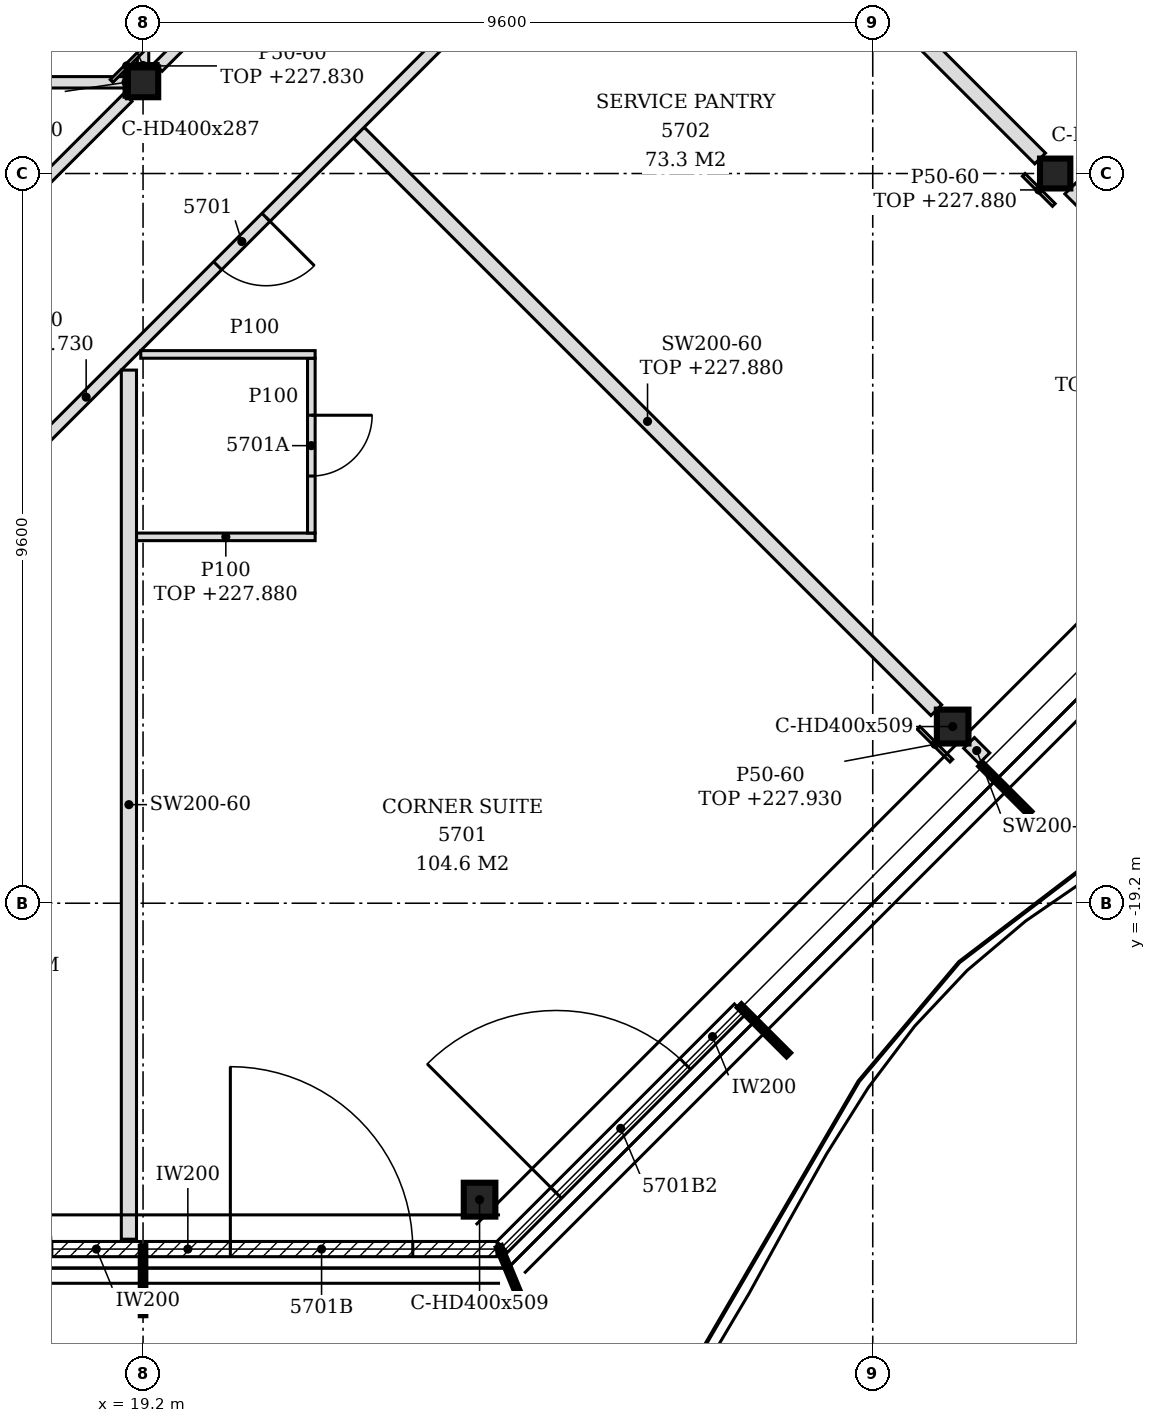
"""IFC4 building model, lengths in metres.
Left out: names, types, materials, properties, quantities, classifications, styles, units other than length and angle.
Written with IfcOpenShell. Run it as: python <this file> out.ifc"""

import sys

from ifc_helpers import new_model, si_unit, direction, frame, frame_2d, origin, origin_2d, place, context, subcontext, project, spatial, polyline, rectangle, i_section, outline, extrude, element, fill, save


model = new_model("IFC4")
c1 = context("Model", 3, precision=1e-05, world=origin(), true_north=direction((0.0, 1.0)))
c2 = subcontext(c1, "Body", "Model", "MODEL_VIEW")
j1 = project(units=[si_unit("LENGTHUNIT", "METRE"), si_unit("PLANEANGLEUNIT", "RADIAN")], contexts=[c1])
p1 = place(None, origin())
s1 = spatial("IfcSite", under=j1, at=p1, CompositionType="ELEMENT")
p2 = place(p1, origin())
s2 = spatial("IfcBuilding", under=s1, at=p2, CompositionType="ELEMENT")
p3 = place(p2, frame((0.0, 0.0, 225.0)))
s3 = spatial("IfcBuildingStorey", under=s2, at=p3, CompositionType="ELEMENT", Elevation=225.0)
for number, where, z_axis, x_axis in (
    (1, (23.627, -23.1, -0.15), (0.0, 0.0, 1.0), (1.0, 0.0, 0.0)),
    (2, (29.852, -16.876, -0.15), (0.0, 0.0, 1.0), (1.0, 0.0, 0.0)),
):
    element("IfcColumn", number, at=place(p3, frame(where, z_axis=z_axis, x_axis=x_axis)), inside=s3, PredefinedType="COLUMN", context=c2, shape_type="SweptSolid", body=[
        extrude(i_section(OverallWidth=0.416, OverallDepth=0.446, WebThickness=0.039, FlangeThickness=0.063, FilletRadius=0.015, at=origin_2d()), origin(), (0.0, 0.0, 1.0), 3.6),
    ])
for number, where, z_axis, x_axis in (
    (3, (19.2, -8.4, -0.15), (0.0, 0.0, 1.0), (1.0, 0.0, 0.0)),
    (4, (31.2, -9.6, -0.15), (0.0, 0.0, 1.0), (1.0, 0.0, 0.0)),
):
    element("IfcColumn", number, at=place(p3, frame(where, z_axis=z_axis, x_axis=x_axis)), inside=s3, PredefinedType="COLUMN", context=c2, shape_type="SweptSolid", body=[
        extrude(i_section(OverallWidth=0.399, OverallDepth=0.393, WebThickness=0.023, FlangeThickness=0.037, FilletRadius=0.015, at=origin_2d()), origin(), (0.0, 0.0, 1.0), 3.6),
    ])
p4 = place(p3, frame((14.43, -23.75, 0.0), z_axis=(0.0, 0.0, 1.0), x_axis=(1.0, 0.0, 0.0)))
e5 = element("IfcWall", 5, at=p4, inside=s3, PredefinedType="NOTDEFINED", context=c2, shape_type="SweptSolid", body=[
    extrude(rectangle(XDim=4.74, YDim=0.2, at=frame_2d((2.37, 0.0))), origin(), (0.0, 0.0, 1.0), 3.45),
])
p5 = place(p4, frame((1.17, 0.0, 0.0)))
e6 = element("IfcOpeningElement", 6, at=p5, cuts=e5, PredefinedType="OPENING", context=c2, shape_type="SweptSolid", body=[
    extrude(rectangle(XDim=2.4, YDim=2.4, at=frame_2d((1.2, 1.2))), frame((0.0, 0.11, 0.0), z_axis=(0.0, -1.0, 0.0), x_axis=(1.0, 0.0, 0.0)), (0.0, 0.0, 1.0), 0.22),
])
p6 = place(p3, frame((19.23, -23.75, 0.0), z_axis=(0.0, 0.0, 1.0), x_axis=(1.0, 0.0, 0.0)))
e7 = element("IfcWall", 7, at=p6, inside=s3, PredefinedType="NOTDEFINED", context=c2, shape_type="SweptSolid", body=[
    extrude(rectangle(XDim=4.626, YDim=0.2, at=frame_2d((2.313, 0.0))), origin(), (0.0, 0.0, 1.0), 3.45),
])
p7 = place(p6, frame((1.119, 0.0, 0.0)))
e8 = element("IfcOpeningElement", 8, at=p7, cuts=e7, PredefinedType="OPENING", context=c2, shape_type="SweptSolid", body=[
    extrude(rectangle(XDim=2.4, YDim=2.4, at=frame_2d((1.2, 1.2))), frame((0.0, 0.11, 0.0), z_axis=(0.0, -1.0, 0.0), x_axis=(1.0, 0.0, 0.0)), (0.0, 0.0, 1.0), 0.22),
])
p8 = place(p3, frame((23.925, -23.722, 0.0), z_axis=(0.0, 0.0, 1.0), x_axis=(0.707106781187, 0.707106781187, 0.0)))
e9 = element("IfcWall", 9, at=p8, inside=s3, PredefinedType="NOTDEFINED", context=c2, shape_type="SweptSolid", body=[
    extrude(rectangle(XDim=4.421, YDim=0.2, at=frame_2d((2.21, 0.0))), origin(), (0.0, 0.0, 1.0), 3.45),
])
p9 = place(p8, frame((1.005, 0.0, 0.0)))
e10 = element("IfcOpeningElement", 10, at=p9, cuts=e9, PredefinedType="OPENING", context=c2, shape_type="SweptSolid", body=[
    extrude(rectangle(XDim=2.4, YDim=2.4, at=frame_2d((1.2, 1.2))), frame((0.0, 0.11, 0.0), z_axis=(0.0, -1.0, 0.0), x_axis=(1.0, 0.0, 0.0)), (0.0, 0.0, 1.0), 0.22),
])
p10 = place(p3, frame((19.014, -23.62, 0.0), z_axis=(0.0, 0.0, 1.0), x_axis=(0.0, 1.0, 0.0)))
e11 = element("IfcWall", 11, at=p10, inside=s3, PredefinedType="PARTITIONING", context=c2, shape_type="SweptSolid", body=[
    extrude(outline(polyline([(0.0, 0.0), (11.434, 0.0), (11.434, 2.73), (0.64, 2.73), (0.638, 2.93), (0.37, 2.93), (0.368, 3.45), (0.0, 3.45), (0.0, 0.0)])), frame((0.0, 0.1, 0.0), z_axis=(0.0, -1.0, 0.0), x_axis=(1.0, 0.0, 0.0)), (0.0, 0.0, 1.0), 0.2),
])
p11 = place(p3, frame((30.269, -17.293, 0.0), z_axis=(0.0, 0.0, 1.0), x_axis=(-0.707106781187, 0.707106781187, 0.0)))
e12 = element("IfcWall", 12, at=p11, inside=s3, PredefinedType="PARTITIONING", context=c2, shape_type="SweptSolid", body=[
    extrude(rectangle(XDim=0.285, YDim=0.2, at=frame_2d((0.143, 0.0))), origin(), (0.0, 0.0, 1.0), 3.45),
])
p12 = place(p3, frame((29.636, -16.66, 0.0), z_axis=(0.0, 0.0, 1.0), x_axis=(-0.707095420673, 0.707118141518, 0.0)))
e13 = element("IfcWall", 13, at=p12, inside=s3, PredefinedType="PARTITIONING", context=c2, shape_type="SweptSolid", body=[
    extrude(rectangle(XDim=10.745, YDim=0.2, at=frame_2d((5.373, 0.0))), origin(), (0.0, 0.0, 1.0), 2.88),
])
p13 = place(p3, frame((19.114, -14.38, 0.0), z_axis=(0.0, 0.0, 1.0), x_axis=(1.0, 0.0, 0.0)))
e14 = element("IfcWall", 14, at=p13, inside=s3, PredefinedType="PARTITIONING", context=c2, shape_type="SweptSolid", body=[
    extrude(outline(polyline([(0.0, 0.0), (2.35, 0.0), (2.35, 2.88), (0.236, 2.88), (0.234, 2.73), (0.0, 2.73), (0.0, 0.0)])), frame((0.0, 0.05, 0.0), z_axis=(0.0, -1.0, 0.0), x_axis=(1.0, 0.0, 0.0)), (0.0, 0.0, 1.0), 0.1),
])
p14 = place(p3, frame((16.722, -14.272, 0.0), z_axis=(0.0, 0.0, 1.0), x_axis=(0.707106781187, 0.707106781187, 0.0)))
e15 = element("IfcWall", 15, at=p14, inside=s3, PredefinedType="PARTITIONING", context=c2, shape_type="SweptSolid", body=[
    extrude(rectangle(XDim=20.049, YDim=0.15, at=frame_2d((10.025, 0.0))), origin(), (0.0, 0.0, 1.0), 2.73),
])
p15 = place(p14, frame((4.892, 0.0, 0.0)))
e16 = element("IfcOpeningElement", 16, at=p15, cuts=e15, PredefinedType="OPENING", context=c2, shape_type="SweptSolid", body=[
    extrude(rectangle(XDim=0.9, YDim=2.1, at=frame_2d((0.45, 1.05))), frame((0.0, 0.085, 0.0), z_axis=(0.0, -1.0, 0.0), x_axis=(1.0, 0.0, 0.0)), (0.0, 0.0, 1.0), 0.17),
])
p16 = place(p14, frame((10.042, 0.0, 0.0)))
e17 = element("IfcOpeningElement", 17, at=p16, cuts=e15, PredefinedType="OPENING", context=c2, shape_type="SweptSolid", body=[
    extrude(rectangle(XDim=0.9, YDim=2.1, at=frame_2d((0.45, 1.05))), frame((0.0, 0.085, 0.0), z_axis=(0.0, -1.0, 0.0), x_axis=(1.0, 0.0, 0.0)), (0.0, 0.0, 1.0), 0.17),
])
p17 = place(p14, frame((14.443, 0.0, 0.0)))
e18 = element("IfcOpeningElement", 18, at=p17, cuts=e15, PredefinedType="OPENING", context=c2, shape_type="SweptSolid", body=[
    extrude(rectangle(XDim=0.9, YDim=2.1, at=frame_2d((0.45, 1.05))), frame((0.0, 0.085, 0.0), z_axis=(0.0, -1.0, 0.0), x_axis=(1.0, 0.0, 0.0)), (0.0, 0.0, 1.0), 0.17),
])
p18 = place(p14, frame((17.837, 0.0, 0.0)))
e19 = element("IfcOpeningElement", 19, at=p18, cuts=e15, PredefinedType="OPENING", context=c2, shape_type="SweptSolid", body=[
    extrude(rectangle(XDim=0.9, YDim=2.1, at=frame_2d((0.45, 1.05))), frame((0.0, 0.085, 0.0), z_axis=(0.0, -1.0, 0.0), x_axis=(1.0, 0.0, 0.0)), (0.0, 0.0, 1.0), 0.17),
])
p19 = place(p3, frame((21.414, -14.33, 0.0), z_axis=(0.0, 0.0, 1.0), x_axis=(0.0, 1.0, 0.0)))
e20 = element("IfcWall", 20, at=p19, inside=s3, PredefinedType="PARTITIONING", context=c2, shape_type="SweptSolid", body=[
    extrude(outline(polyline([(0.0, 0.0), (2.3, 0.0), (2.3, 3.45), (0.035, 3.45), (0.033, 2.88), (0.0, 2.88), (0.0, 0.0)])), frame((0.0, 0.05, 0.0), z_axis=(0.0, -1.0, 0.0), x_axis=(1.0, 0.0, 0.0)), (0.0, 0.0, 1.0), 0.1),
])
p20 = place(p19, frame((0.75, 0.0, 0.0)))
e21 = element("IfcOpeningElement", 21, at=p20, cuts=e20, PredefinedType="OPENING", context=c2, shape_type="SweptSolid", body=[
    extrude(rectangle(XDim=0.8, YDim=2.1, at=frame_2d((0.4, 1.05))), frame((0.0, 0.06, 0.0), z_axis=(0.0, -1.0, 0.0), x_axis=(1.0, 0.0, 0.0)), (0.0, 0.0, 1.0), 0.12),
])
p21 = place(p3, frame((34.581, -12.981, 0.0), z_axis=(0.0, 0.0, 1.0), x_axis=(-0.707133900936, 0.707079660397, 0.0)))
e22 = element("IfcWall", 22, at=p21, inside=s3, PredefinedType="PARTITIONING", context=c2, shape_type="SweptSolid", body=[
    extrude(rectangle(XDim=4.501, YDim=0.2, at=frame_2d((2.25, 0.0))), origin(), (0.0, 0.0, 1.0), 2.63),
])
p22 = place(p3, frame((19.17, -11.98, 0.0), z_axis=(0.0, 0.0, 1.0), x_axis=(1.0, 0.0, 0.0)))
e23 = element("IfcWall", 23, at=p22, inside=s3, PredefinedType="PARTITIONING", context=c2, shape_type="SweptSolid", body=[
    extrude(outline(polyline([(0.0, 0.0), (2.294, 0.0), (2.294, 3.45), (0.18, 3.45), (0.178, 2.73), (0.0, 2.73), (0.0, 0.0)])), frame((0.0, 0.05, 0.0), z_axis=(0.0, -1.0, 0.0), x_axis=(1.0, 0.0, 0.0)), (0.0, 0.0, 1.0), 0.1),
])
p23 = place(p3, frame((15.728, -11.872, 0.0), z_axis=(0.0, 0.0, 1.0), x_axis=(0.707080416772, 0.707133144618, 0.0)))
e24 = element("IfcWall", 24, at=p23, inside=s3, PredefinedType="PARTITIONING", context=c2, shape_type="SweptSolid", body=[
    extrude(rectangle(XDim=4.63, YDim=0.15, at=frame_2d((2.315, 0.0))), origin(), (0.0, 0.0, 1.0), 3.45),
])
p24 = place(p3, frame((35.86, -10.436, 0.0), z_axis=(0.0, 0.0, 1.0), x_axis=(-0.707106781187, 0.707106781187, 0.0)))
e25 = element("IfcWall", 25, at=p24, inside=s3, PredefinedType="PARTITIONING", context=c2, shape_type="SweptSolid", body=[
    extrude(rectangle(XDim=10.745, YDim=0.2, at=frame_2d((5.373, 0.0))), origin(), (0.0, 0.0, 1.0), 2.88),
])
p25 = place(p3, frame((31.002, -9.402, 0.0), z_axis=(0.0, 0.0, 1.0), x_axis=(-0.707088226093, 0.707125335793, 0.0)))
e26 = element("IfcWall", 26, at=p25, inside=s3, PredefinedType="PARTITIONING", context=c2, shape_type="SweptSolid", body=[
    extrude(rectangle(XDim=6.579, YDim=0.2, at=frame_2d((3.29, 0.0))), origin(), (0.0, 0.0, 1.0), 2.88),
])
p26 = place(p3, frame((7.399, -8.4, 0.0), z_axis=(0.0, 0.0, 1.0), x_axis=(1.0, 0.0, 0.0)))
e27 = element("IfcWall", 27, at=p26, inside=s3, PredefinedType="PARTITIONING", context=c2, shape_type="SweptSolid", body=[
    extrude(rectangle(XDim=11.601, YDim=0.15, at=frame_2d((5.801, 0.0))), origin(), (0.0, 0.0, 1.0), 2.83),
])
p27 = place(p26, frame((5.351, 0.0, 0.0)))
e28 = element("IfcOpeningElement", 28, at=p27, cuts=e27, PredefinedType="OPENING", context=c2, shape_type="SweptSolid", body=[
    extrude(rectangle(XDim=0.9, YDim=2.1, at=frame_2d((0.45, 1.05))), frame((0.0, 0.085, 0.0), z_axis=(0.0, -1.0, 0.0), x_axis=(1.0, 0.0, 0.0)), (0.0, 0.0, 1.0), 0.17),
])
p28 = place(p3, frame((19.2, -8.204, 0.0), z_axis=(0.0, 0.0, 1.0), x_axis=(0.0, 1.0, 0.0)))
e29 = element("IfcWall", 29, at=p28, inside=s3, PredefinedType="PARTITIONING", context=c2, shape_type="SweptSolid", body=[
    extrude(rectangle(XDim=9.329, YDim=0.15, at=frame_2d((4.664, 0.0))), origin(), (0.0, 0.0, 1.0), 2.83),
])
p29 = place(p28, frame((7.354, 0.0, 0.0)))
e30 = element("IfcOpeningElement", 30, at=p29, cuts=e29, PredefinedType="OPENING", context=c2, shape_type="SweptSolid", body=[
    extrude(rectangle(XDim=0.8, YDim=2.1, at=frame_2d((0.4, 1.05))), frame((0.0, 0.085, 0.0), z_axis=(0.0, -1.0, 0.0), x_axis=(1.0, 0.0, 0.0)), (0.0, 0.0, 1.0), 0.17),
])
p30 = place(p28, frame((4.503, 0.0, 0.0)))
e31 = element("IfcOpeningElement", 31, at=p30, cuts=e29, PredefinedType="OPENING", context=c2, shape_type="SweptSolid", body=[
    extrude(rectangle(XDim=0.8, YDim=2.1, at=frame_2d((0.4, 1.05))), frame((0.0, 0.085, 0.0), z_axis=(0.0, -1.0, 0.0), x_axis=(1.0, 0.0, 0.0)), (0.0, 0.0, 1.0), 0.17),
])
p31 = place(p3, frame((19.398, -8.202, 0.0), z_axis=(0.0, 0.0, 1.0), x_axis=(0.707116088468, 0.707097473782, 0.0)))
e32 = element("IfcWall", 32, at=p31, inside=s3, PredefinedType="PARTITIONING", context=c2, shape_type="SweptSolid", body=[
    extrude(rectangle(XDim=13.115, YDim=0.15, at=frame_2d((6.558, 0.0))), origin(), (0.0, 0.0, 1.0), 2.88),
])
p32 = place(p31, frame((6.058, 0.0, 0.0)))
e33 = element("IfcOpeningElement", 33, at=p32, cuts=e32, PredefinedType="OPENING", context=c2, shape_type="SweptSolid", body=[
    extrude(rectangle(XDim=0.9, YDim=2.1, at=frame_2d((0.45, 1.05))), frame((0.0, 0.085, 0.0), z_axis=(0.0, -1.0, 0.0), x_axis=(1.0, 0.0, 0.0)), (0.0, 0.0, 1.0), 0.17),
])
p33 = place(p3, frame((39.331, -8.131, 0.0), z_axis=(0.0, 0.0, 1.0), x_axis=(-0.707106781187, 0.707106781187, 0.0)))
e34 = element("IfcWall", 34, at=p33, inside=s3, PredefinedType="PARTITIONING", context=c2, shape_type="SweptSolid", body=[
    extrude(rectangle(XDim=11.219, YDim=0.2, at=frame_2d((5.61, 0.0))), origin(), (0.0, 0.0, 1.0), 2.93),
])
p34 = place(p3, frame((29.834, -17.324, 0.0), z_axis=(0.0, 0.0, 1.0), x_axis=(-0.706906496032, 0.707307009627, 0.0)))
e35 = element("IfcWall", 35, at=p34, inside=s3, PredefinedType="PARTITIONING", context=c2, shape_type="SweptSolid", body=[
    extrude(rectangle(XDim=0.61, YDim=0.05, at=frame_2d((0.305, 0.0))), origin(), (0.0, 0.0, 1.0), 2.93),
])
p35 = place(p3, frame((31.182, -10.014, 0.0), z_axis=(0.0, 0.0, 1.0), x_axis=(-0.707106781187, 0.707106781187, 0.0)))
e36 = element("IfcWall", 36, at=p35, inside=s3, PredefinedType="PARTITIONING", context=c2, shape_type="SweptSolid", body=[
    extrude(rectangle(XDim=0.56, YDim=0.05, at=frame_2d((0.28, 0.0))), origin(), (0.0, 0.0, 1.0), 2.88),
])
p36 = place(p3, frame((18.786, -8.382, 0.0), z_axis=(0.0, 0.0, 1.0), x_axis=(0.707106781187, 0.707106781187, 0.0)))
e37 = element("IfcWall", 37, at=p36, inside=s3, PredefinedType="PARTITIONING", context=c2, shape_type="SweptSolid", body=[
    extrude(rectangle(XDim=0.56, YDim=0.05, at=frame_2d((0.28, 0.0))), origin(), (0.0, 0.0, 1.0), 2.83),
])
p37 = place(p3, frame((19.0, -8.178, 0.0), z_axis=(0.0, 0.0, 1.0), x_axis=(1.0, 0.0, 0.0)))
e38 = element("IfcWall", 38, at=p37, inside=s3, PredefinedType="PARTITIONING", context=c2, shape_type="SweptSolid", body=[
    extrude(rectangle(XDim=0.399, YDim=0.05, at=frame_2d((0.199, 0.0))), origin(), (0.0, 0.0, 1.0), 2.83),
])
p38 = place(p3, frame((18.976, -8.596, 0.0), z_axis=(0.0, 0.0, 1.0), x_axis=(0.0, 1.0, 0.0)))
e39 = element("IfcWall", 39, at=p38, inside=s3, PredefinedType="PARTITIONING", context=c2, shape_type="SweptSolid", body=[
    extrude(rectangle(XDim=0.393, YDim=0.05, at=frame_2d((0.196, 0.0))), origin(), (0.0, 0.0, 1.0), 2.83),
])
p39 = place(p7, origin())
e40 = element("IfcDoor", 40, at=p39, inside=s3, OperationType="SINGLE_SWING_LEFT", PredefinedType="DOOR", context=c2, shape_type="SweptSolid", body=[
    extrude(rectangle(XDim=2.4, YDim=2.4, at=frame_2d((1.2, 1.2))), frame((0.0, 0.025, 0.0), z_axis=(0.0, -1.0, 0.0), x_axis=(1.0, 0.0, 0.0)), (0.0, 0.0, 1.0), 0.05),
])
fill(e8, e40)
p40 = place(p9, origin())
e41 = element("IfcDoor", 41, at=p40, inside=s3, OperationType="SINGLE_SWING_LEFT", PredefinedType="DOOR", context=c2, shape_type="SweptSolid", body=[
    extrude(rectangle(XDim=2.4, YDim=2.4, at=frame_2d((1.2, 1.2))), frame((0.0, 0.025, 0.0), z_axis=(0.0, -1.0, 0.0), x_axis=(1.0, 0.0, 0.0)), (0.0, 0.0, 1.0), 0.05),
])
fill(e10, e41)
p41 = place(p15, frame((0.9, 0.0, 0.0), z_axis=(0.0, 0.0, 1.0), x_axis=(-1.0, 0.0, 0.0)))
e42 = element("IfcDoor", 42, at=p41, inside=s3, OperationType="SINGLE_SWING_LEFT", PredefinedType="DOOR", context=c2, shape_type="SweptSolid", body=[
    extrude(rectangle(XDim=0.9, YDim=2.1, at=frame_2d((0.45, 1.05))), frame((0.0, 0.025, 0.0), z_axis=(0.0, -1.0, 0.0), x_axis=(1.0, 0.0, 0.0)), (0.0, 0.0, 1.0), 0.05),
])
fill(e16, e42)
p42 = place(p20, frame((0.8, 0.0, 0.0), z_axis=(0.0, 0.0, 1.0), x_axis=(-1.0, 0.0, 0.0)))
e43 = element("IfcDoor", 43, at=p42, inside=s3, OperationType="SINGLE_SWING_LEFT", PredefinedType="DOOR", context=c2, shape_type="SweptSolid", body=[
    extrude(rectangle(XDim=0.8, YDim=2.1, at=frame_2d((0.4, 1.05))), frame((0.0, 0.025, 0.0), z_axis=(0.0, -1.0, 0.0), x_axis=(1.0, 0.0, 0.0)), (0.0, 0.0, 1.0), 0.05),
])
fill(e21, e43)
save(model, sys.argv[1])
